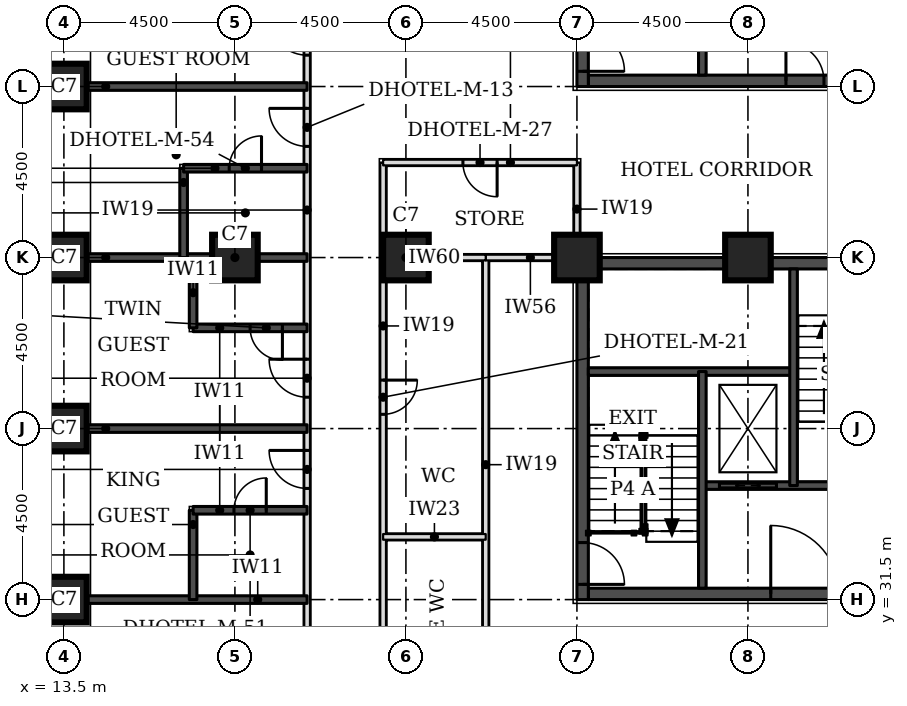
"""IFC4 building model, lengths in metres.
Left out: names, types, materials, properties, quantities, classifications, styles, units other than length and angle.
Written with IfcOpenShell. Run it as: python <this file> out.ifc"""

import sys

from ifc_helpers import new_model, si_unit, direction, frame, frame_2d, origin, origin_2d, place, context, subcontext, project, spatial, rectangle, extrude, element, fill, save


model = new_model("IFC4")
c1 = context("Model", 3, precision=1e-05, world=origin(), true_north=direction((0.0, 1.0)))
c2 = subcontext(c1, "Body", "Model", "MODEL_VIEW")
j1 = project(units=[si_unit("LENGTHUNIT", "METRE"), si_unit("PLANEANGLEUNIT", "RADIAN")], contexts=[c1])
p1 = place(None, origin())
s1 = spatial("IfcSite", under=j1, at=p1, CompositionType="ELEMENT")
p2 = place(p1, origin())
s2 = spatial("IfcBuilding", under=s1, at=p2, CompositionType="ELEMENT")
p3 = place(p2, frame((0.0, 0.0, 23.1)))
s3 = spatial("IfcBuildingStorey", under=s2, at=p3, CompositionType="ELEMENT", Elevation=23.1)
for number, where, z_axis, x_axis in (
    (1, (13.5, 31.5, 0.0), (0.0, 0.0, 1.0), (1.0, 0.0, 0.0)),
    (2, (13.5, 36.0, 0.0), (0.0, 0.0, 1.0), (1.0, 0.0, 0.0)),
    (3, (13.5, 40.5, 0.0), (0.0, 0.0, 1.0), (1.0, 0.0, 0.0)),
    (4, (18.0, 40.5, 0.0), (0.0, 0.0, 1.0), (1.0, 0.0, 0.0)),
    (5, (22.5, 40.5, 0.0), (0.0, 0.0, 1.0), (1.0, 0.0, 0.0)),
    (6, (27.0, 40.5, 0.0), (0.0, 0.0, 1.0), (1.0, 0.0, 0.0)),
    (7, (31.5, 40.5, 0.0), (0.0, 0.0, 1.0), (1.0, 0.0, 0.0)),
    (8, (13.5, 45.0, 0.0), (0.0, 0.0, 1.0), (1.0, 0.0, 0.0)),
):
    element("IfcColumn", number, at=place(p3, frame(where, z_axis=z_axis, x_axis=x_axis)), inside=s3, PredefinedType="COLUMN", context=c2, shape_type="SweptSolid", body=[
        extrude(rectangle(XDim=1.2, YDim=1.2, at=origin_2d()), origin(), (0.0, 0.0, 1.0), 3.3),
    ])
p4 = place(p3, frame((27.3, 45.15, 0.0), z_axis=(0.0, 0.0, 1.0), x_axis=(1.0, 0.0, 0.0)))
e9 = element("IfcWall", 9, at=p4, inside=s3, PredefinedType="SHEAR", context=c2, shape_type="SweptSolid", body=[
    extrude(rectangle(XDim=8.4, YDim=0.3, at=frame_2d((4.2, 0.0))), origin(), (0.0, 0.0, 1.0), 3.3),
])
p5 = place(p4, frame((5.2, 0.0, 0.0)))
e10 = element("IfcOpeningElement", 10, at=p5, cuts=e9, PredefinedType="OPENING", context=c2, shape_type="SweptSolid", body=[
    extrude(rectangle(XDim=1.0, YDim=2.1, at=frame_2d((0.5, 1.05))), frame((0.0, 0.16, 0.0), z_axis=(0.0, -1.0, 0.0), x_axis=(1.0, 0.0, 0.0)), (0.0, 0.0, 1.0), 0.32),
])
p6 = place(p3, frame((27.15, 45.0, 0.0), z_axis=(0.0, 0.0, 1.0), x_axis=(0.0, 1.0, 0.0)))
e11 = element("IfcWall", 11, at=p6, inside=s3, PredefinedType="SHEAR", context=c2, shape_type="SweptSolid", body=[
    extrude(rectangle(XDim=9.0, YDim=0.3, at=frame_2d((4.5, 0.0))), origin(), (0.0, 0.0, 1.0), 3.3),
])
p7 = place(p6, frame((0.4, 0.0, 0.0)))
e12 = element("IfcOpeningElement", 12, at=p7, cuts=e11, PredefinedType="OPENING", context=c2, shape_type="SweptSolid", body=[
    extrude(rectangle(XDim=1.1, YDim=2.1, at=frame_2d((0.55, 1.05))), frame((0.0, 0.16, 0.0), z_axis=(0.0, -1.0, 0.0), x_axis=(1.0, 0.0, 0.0)), (0.0, 0.0, 1.0), 0.32),
])
p8 = place(p3, frame((27.3, 31.65, 0.0), z_axis=(0.0, 0.0, 1.0), x_axis=(1.0, 0.0, 0.0)))
e13 = element("IfcWall", 13, at=p8, inside=s3, PredefinedType="SHEAR", context=c2, shape_type="SweptSolid", body=[
    extrude(rectangle(XDim=8.4, YDim=0.3, at=frame_2d((4.2, 0.0))), origin(), (0.0, 0.0, 1.0), 3.3),
])
p9 = place(p8, frame((4.8, 0.0, 0.0)))
e14 = element("IfcOpeningElement", 14, at=p9, cuts=e13, PredefinedType="OPENING", context=c2, shape_type="SweptSolid", body=[
    extrude(rectangle(XDim=1.8, YDim=2.1, at=frame_2d((0.9, 1.05))), frame((0.0, 0.16, 0.0), z_axis=(0.0, -1.0, 0.0), x_axis=(1.0, 0.0, 0.0)), (0.0, 0.0, 1.0), 0.32),
])
p10 = place(p3, frame((27.3, 40.35, 0.0), z_axis=(0.0, 0.0, 1.0), x_axis=(1.0, 0.0, 0.0)))
e15 = element("IfcWall", 15, at=p10, inside=s3, PredefinedType="SHEAR", context=c2, shape_type="SweptSolid", body=[
    extrude(rectangle(XDim=8.4, YDim=0.3, at=frame_2d((4.2, 0.0))), origin(), (0.0, 0.0, 1.0), 3.3),
])
p11 = place(p10, frame((6.4, 0.0, 0.0)))
e16 = element("IfcOpeningElement", 16, at=p11, cuts=e15, PredefinedType="OPENING", context=c2, shape_type="SweptSolid", body=[
    extrude(rectangle(XDim=1.1, YDim=2.1, at=frame_2d((0.55, 1.05))), frame((0.0, 0.16, 0.0), z_axis=(0.0, -1.0, 0.0), x_axis=(1.0, 0.0, 0.0)), (0.0, 0.0, 1.0), 0.32),
])
p12 = place(p3, frame((27.15, 31.5, 0.0), z_axis=(0.0, 0.0, 1.0), x_axis=(0.0, 1.0, 0.0)))
e17 = element("IfcWall", 17, at=p12, inside=s3, PredefinedType="SHEAR", context=c2, shape_type="SweptSolid", body=[
    extrude(rectangle(XDim=9.0, YDim=0.3, at=frame_2d((4.5, 0.0))), origin(), (0.0, 0.0, 1.0), 3.3),
])
p13 = place(p12, frame((0.4, 0.0, 0.0)))
e18 = element("IfcOpeningElement", 18, at=p13, cuts=e17, PredefinedType="OPENING", context=c2, shape_type="SweptSolid", body=[
    extrude(rectangle(XDim=1.1, YDim=2.1, at=frame_2d((0.55, 1.05))), frame((0.0, 0.16, 0.0), z_axis=(0.0, -1.0, 0.0), x_axis=(1.0, 0.0, 0.0)), (0.0, 0.0, 1.0), 0.32),
])
p14 = place(p3, frame((19.9, 24.4, 0.0), z_axis=(0.0, 0.0, 1.0), x_axis=(0.0, 1.0, 0.0)))
e19 = element("IfcWall", 19, at=p14, inside=s3, PredefinedType="PARTITIONING", context=c2, shape_type="SweptSolid", body=[
    extrude(rectangle(XDim=25.1, YDim=0.15, at=frame_2d((12.55, 0.0))), origin(), (0.0, 0.0, 1.0), 3.08),
])
p15 = place(p14, frame((0.447, 0.0, 0.0)))
e20 = element("IfcOpeningElement", 20, at=p15, cuts=e19, PredefinedType="OPENING", context=c2, shape_type="SweptSolid", body=[
    extrude(rectangle(XDim=0.9, YDim=2.1, at=frame_2d((0.45, 1.05))), frame((0.0, 0.085, 0.0), z_axis=(0.0, -1.0, 0.0), x_axis=(1.0, 0.0, 0.0)), (0.0, 0.0, 1.0), 0.17),
])
p16 = place(p14, frame((4.4, 0.0, 0.0)))
e21 = element("IfcOpeningElement", 21, at=p16, cuts=e19, PredefinedType="OPENING", context=c2, shape_type="SweptSolid", body=[
    extrude(rectangle(XDim=0.9, YDim=2.1, at=frame_2d((0.45, 1.05))), frame((0.0, 0.085, 0.0), z_axis=(0.0, -1.0, 0.0), x_axis=(1.0, 0.0, 0.0)), (0.0, 0.0, 1.0), 0.17),
])
p17 = place(p14, frame((10.025, 0.0, 0.0)))
e22 = element("IfcOpeningElement", 22, at=p17, cuts=e19, PredefinedType="OPENING", context=c2, shape_type="SweptSolid", body=[
    extrude(rectangle(XDim=1.0, YDim=2.1, at=frame_2d((0.5, 1.05))), frame((0.0, 0.085, 0.0), z_axis=(0.0, -1.0, 0.0), x_axis=(1.0, 0.0, 0.0)), (0.0, 0.0, 1.0), 0.17),
])
p18 = place(p14, frame((12.425, 0.0, 0.0)))
e23 = element("IfcOpeningElement", 23, at=p18, cuts=e19, PredefinedType="OPENING", context=c2, shape_type="SweptSolid", body=[
    extrude(rectangle(XDim=1.0, YDim=2.1, at=frame_2d((0.5, 1.05))), frame((0.0, 0.085, 0.0), z_axis=(0.0, -1.0, 0.0), x_axis=(1.0, 0.0, 0.0)), (0.0, 0.0, 1.0), 0.17),
])
p19 = place(p14, frame((19.025, 0.0, 0.0)))
e24 = element("IfcOpeningElement", 24, at=p19, cuts=e19, PredefinedType="OPENING", context=c2, shape_type="SweptSolid", body=[
    extrude(rectangle(XDim=1.0, YDim=2.1, at=frame_2d((0.5, 1.05))), frame((0.0, 0.085, 0.0), z_axis=(0.0, -1.0, 0.0), x_axis=(1.0, 0.0, 0.0)), (0.0, 0.0, 1.0), 0.17),
])
p20 = place(p14, frame((21.425, 0.0, 0.0)))
e25 = element("IfcOpeningElement", 25, at=p20, cuts=e19, PredefinedType="OPENING", context=c2, shape_type="SweptSolid", body=[
    extrude(rectangle(XDim=1.0, YDim=2.1, at=frame_2d((0.5, 1.05))), frame((0.0, 0.085, 0.0), z_axis=(0.0, -1.0, 0.0), x_axis=(1.0, 0.0, 0.0)), (0.0, 0.0, 1.0), 0.17),
])
p21 = place(p3, frame((21.9, 26.4, 0.0), z_axis=(0.0, 0.0, 1.0), x_axis=(0.0, 1.0, 0.0)))
e26 = element("IfcWall", 26, at=p21, inside=s3, PredefinedType="PARTITIONING", context=c2, shape_type="SweptSolid", body=[
    extrude(rectangle(XDim=16.6, YDim=0.15, at=frame_2d((8.3, 0.0))), origin(), (0.0, 0.0, 1.0), 3.08),
])
p22 = place(p21, frame((2.925, 0.0, 0.0)))
e27 = element("IfcOpeningElement", 27, at=p22, cuts=e26, PredefinedType="OPENING", context=c2, shape_type="SweptSolid", body=[
    extrude(rectangle(XDim=0.9, YDim=2.1, at=frame_2d((0.45, 1.05))), frame((0.0, 0.085, 0.0), z_axis=(0.0, -1.0, 0.0), x_axis=(1.0, 0.0, 0.0)), (0.0, 0.0, 1.0), 0.17),
])
p23 = place(p21, frame((9.975, 0.0, 0.0)))
e28 = element("IfcOpeningElement", 28, at=p23, cuts=e26, PredefinedType="OPENING", context=c2, shape_type="SweptSolid", body=[
    extrude(rectangle(XDim=0.9, YDim=2.1, at=frame_2d((0.45, 1.05))), frame((0.0, 0.085, 0.0), z_axis=(0.0, -1.0, 0.0), x_axis=(1.0, 0.0, 0.0)), (0.0, 0.0, 1.0), 0.17),
])
p24 = place(p3, frame((24.6, 26.4, 0.0), z_axis=(0.0, 0.0, 1.0), x_axis=(0.0, 1.0, 0.0)))
e29 = element("IfcWall", 29, at=p24, inside=s3, PredefinedType="PARTITIONING", context=c2, shape_type="SweptSolid", body=[
    extrude(rectangle(XDim=14.1, YDim=0.15, at=frame_2d((7.05, 0.0))), origin(), (0.0, 0.0, 1.0), 3.08),
])
p25 = place(p3, frame((24.6, 40.5, 0.0), z_axis=(0.0, 0.0, 1.0), x_axis=(1.0, 0.0, 0.0)))
e30 = element("IfcWall", 30, at=p25, inside=s3, PredefinedType="PARTITIONING", context=c2, shape_type="SweptSolid", body=[
    extrude(rectangle(XDim=2.35, YDim=0.15, at=frame_2d((1.175, 0.0))), origin(), (0.0, 0.0, 1.0), 2.33),
])
p26 = place(p3, frame((27.0, 40.55, 0.0), z_axis=(0.0, 0.0, 1.0), x_axis=(0.0, 1.0, 0.0)))
e31 = element("IfcWall", 31, at=p26, inside=s3, PredefinedType="PARTITIONING", context=c2, shape_type="SweptSolid", body=[
    extrude(rectangle(XDim=2.45, YDim=0.15, at=frame_2d((1.225, 0.0))), origin(), (0.0, 0.0, 1.0), 3.08),
])
p27 = place(p3, frame((21.9, 43.0, 0.0), z_axis=(0.0, 0.0, 1.0), x_axis=(1.0, 0.0, 0.0)))
e32 = element("IfcWall", 32, at=p27, inside=s3, PredefinedType="PARTITIONING", context=c2, shape_type="SweptSolid", body=[
    extrude(rectangle(XDim=5.1, YDim=0.15, at=frame_2d((2.55, 0.0))), origin(), (0.0, 0.0, 1.0), 3.08),
])
p28 = place(p27, frame((2.1, 0.0, 0.0)))
e33 = element("IfcOpeningElement", 33, at=p28, cuts=e32, PredefinedType="OPENING", context=c2, shape_type="SweptSolid", body=[
    extrude(rectangle(XDim=0.9, YDim=2.1, at=frame_2d((0.45, 1.05))), frame((0.0, 0.085, 0.0), z_axis=(0.0, -1.0, 0.0), x_axis=(1.0, 0.0, 0.0)), (0.0, 0.0, 1.0), 0.17),
])
p29 = place(p3, frame((14.1, 31.5, 0.0), z_axis=(0.0, 0.0, 1.0), x_axis=(1.0, 0.0, 0.0)))
e34 = element("IfcWall", 34, at=p29, inside=s3, PredefinedType="SOLIDWALL", context=c2, shape_type="SweptSolid", body=[
    extrude(rectangle(XDim=5.8, YDim=0.2, at=frame_2d((2.9, 0.0))), origin(), (0.0, 0.0, 1.0), 3.08),
])
p30 = place(p3, frame((16.9, 31.5, 0.0), z_axis=(0.0, 0.0, 1.0), x_axis=(0.0, 1.0, 0.0)))
e35 = element("IfcWall", 35, at=p30, inside=s3, PredefinedType="SOLIDWALL", context=c2, shape_type="SweptSolid", body=[
    extrude(rectangle(XDim=2.35, YDim=0.2, at=frame_2d((1.175, 0.0))), origin(), (0.0, 0.0, 1.0), 3.08),
])
p31 = place(p3, frame((16.9, 33.85, 0.0), z_axis=(0.0, 0.0, 1.0), x_axis=(1.0, 0.0, 0.0)))
e36 = element("IfcWall", 36, at=p31, inside=s3, PredefinedType="SOLIDWALL", context=c2, shape_type="SweptSolid", body=[
    extrude(rectangle(XDim=3.0, YDim=0.2, at=frame_2d((1.5, 0.0))), origin(), (0.0, 0.0, 1.0), 3.08),
])
p32 = place(p31, frame((1.075, 0.0, 0.0)))
e37 = element("IfcOpeningElement", 37, at=p32, cuts=e36, PredefinedType="OPENING", context=c2, shape_type="SweptSolid", body=[
    extrude(rectangle(XDim=0.85, YDim=2.1, at=frame_2d((0.425, 1.05))), frame((0.0, 0.11, 0.0), z_axis=(0.0, -1.0, 0.0), x_axis=(1.0, 0.0, 0.0)), (0.0, 0.0, 1.0), 0.22),
])
p33 = place(p3, frame((14.1, 36.0, 0.0), z_axis=(0.0, 0.0, 1.0), x_axis=(1.0, 0.0, 0.0)))
e38 = element("IfcWall", 38, at=p33, inside=s3, PredefinedType="SOLIDWALL", context=c2, shape_type="SweptSolid", body=[
    extrude(rectangle(XDim=5.8, YDim=0.2, at=frame_2d((2.9, 0.0))), origin(), (0.0, 0.0, 1.0), 3.08),
])
p34 = place(p3, frame((16.9, 38.65, 0.0), z_axis=(0.0, 0.0, 1.0), x_axis=(1.0, 0.0, 0.0)))
e39 = element("IfcWall", 39, at=p34, inside=s3, PredefinedType="SOLIDWALL", context=c2, shape_type="SweptSolid", body=[
    extrude(rectangle(XDim=3.0, YDim=0.2, at=frame_2d((1.5, 0.0))), origin(), (0.0, 0.0, 1.0), 3.08),
])
p35 = place(p34, frame((1.5, 0.0, 0.0)))
e40 = element("IfcOpeningElement", 40, at=p35, cuts=e39, PredefinedType="OPENING", context=c2, shape_type="SweptSolid", body=[
    extrude(rectangle(XDim=0.85, YDim=2.1, at=frame_2d((0.425, 1.05))), frame((0.0, 0.11, 0.0), z_axis=(0.0, -1.0, 0.0), x_axis=(1.0, 0.0, 0.0)), (0.0, 0.0, 1.0), 0.22),
])
p36 = place(p3, frame((16.9, 38.65, 0.0), z_axis=(0.0, 0.0, 1.0), x_axis=(0.0, 1.0, 0.0)))
e41 = element("IfcWall", 41, at=p36, inside=s3, PredefinedType="SOLIDWALL", context=c2, shape_type="SweptSolid", body=[
    extrude(rectangle(XDim=1.85, YDim=0.2, at=frame_2d((0.925, 0.0))), origin(), (0.0, 0.0, 1.0), 3.08),
])
p37 = place(p3, frame((14.1, 40.5, 0.0), z_axis=(0.0, 0.0, 1.0), x_axis=(1.0, 0.0, 0.0)))
e42 = element("IfcWall", 42, at=p37, inside=s3, PredefinedType="SOLIDWALL", context=c2, shape_type="SweptSolid", body=[
    extrude(rectangle(XDim=5.8, YDim=0.2, at=frame_2d((2.9, 0.0))), origin(), (0.0, 0.0, 1.0), 3.08),
])
p38 = place(p3, frame((16.65, 40.5, 0.0), z_axis=(0.0, 0.0, 1.0), x_axis=(0.0, 1.0, 0.0)))
e43 = element("IfcWall", 43, at=p38, inside=s3, PredefinedType="SOLIDWALL", context=c2, shape_type="SweptSolid", body=[
    extrude(rectangle(XDim=2.35, YDim=0.2, at=frame_2d((1.175, 0.0))), origin(), (0.0, 0.0, 1.0), 3.08),
])
p39 = place(p3, frame((16.65, 42.85, 0.0), z_axis=(0.0, 0.0, 1.0), x_axis=(1.0, 0.0, 0.0)))
e44 = element("IfcWall", 44, at=p39, inside=s3, PredefinedType="SOLIDWALL", context=c2, shape_type="SweptSolid", body=[
    extrude(rectangle(XDim=3.25, YDim=0.2, at=frame_2d((1.625, 0.0))), origin(), (0.0, 0.0, 1.0), 3.08),
])
p40 = place(p39, frame((1.2, 0.0, 0.0)))
e45 = element("IfcOpeningElement", 45, at=p40, cuts=e44, PredefinedType="OPENING", context=c2, shape_type="SweptSolid", body=[
    extrude(rectangle(XDim=0.85, YDim=2.1, at=frame_2d((0.425, 1.05))), frame((0.0, 0.11, 0.0), z_axis=(0.0, -1.0, 0.0), x_axis=(1.0, 0.0, 0.0)), (0.0, 0.0, 1.0), 0.22),
])
p41 = place(p3, frame((14.1, 45.0, 0.0), z_axis=(0.0, 0.0, 1.0), x_axis=(1.0, 0.0, 0.0)))
e46 = element("IfcWall", 46, at=p41, inside=s3, PredefinedType="SOLIDWALL", context=c2, shape_type="SweptSolid", body=[
    extrude(rectangle(XDim=5.8, YDim=0.2, at=frame_2d((2.9, 0.0))), origin(), (0.0, 0.0, 1.0), 3.08),
])
p42 = place(p3, frame((21.9, 33.15, 0.0), z_axis=(0.0, 0.0, 1.0), x_axis=(1.0, 0.0, 0.0)))
e47 = element("IfcWall", 47, at=p42, inside=s3, PredefinedType="PARTITIONING", context=c2, shape_type="SweptSolid", body=[
    extrude(rectangle(XDim=2.7, YDim=0.15, at=frame_2d((1.35, 0.0))), origin(), (0.0, 0.0, 1.0), 3.08),
])
p43 = place(p3, frame((21.9, 40.5, 0.0), z_axis=(0.0, 0.0, 1.0), x_axis=(1.0, 0.0, 0.0)))
e48 = element("IfcWall", 48, at=p43, inside=s3, PredefinedType="PARTITIONING", context=c2, shape_type="SweptSolid", body=[
    extrude(rectangle(XDim=2.7, YDim=0.15, at=frame_2d((1.35, 0.0))), origin(), (0.0, 0.0, 1.0), 2.33),
])
p44 = place(p3, frame((30.3, 45.3, 0.0), z_axis=(0.0, 0.0, 1.0), x_axis=(0.0, 1.0, 0.0)))
e49 = element("IfcWall", 49, at=p44, inside=s3, PredefinedType="SOLIDWALL", context=c2, shape_type="SweptSolid", body=[
    extrude(rectangle(XDim=5.7, YDim=0.2, at=frame_2d((2.85, 0.0))), origin(), (0.0, 0.0, 1.0), 3.08),
])
p45 = place(p3, frame((30.3, 34.5, 0.0), z_axis=(0.0, 0.0, 1.0), x_axis=(1.0, 0.0, 0.0)))
e50 = element("IfcWall", 50, at=p45, inside=s3, PredefinedType="SOLIDWALL", context=c2, shape_type="SweptSolid", body=[
    extrude(rectangle(XDim=5.4, YDim=0.2, at=frame_2d((2.7, 0.0))), origin(), (0.0, 0.0, 1.0), 3.08),
])
p46 = place(p45, frame((0.45, 0.0, 0.0)))
e51 = element("IfcOpeningElement", 51, at=p46, cuts=e50, PredefinedType="OPENING", context=c2, shape_type="SweptSolid", body=[
    extrude(rectangle(XDim=1.5, YDim=2.1, at=frame_2d((0.75, 1.05))), frame((0.0, 0.11, 0.0), z_axis=(0.0, -1.0, 0.0), x_axis=(1.0, 0.0, 0.0)), (0.0, 0.0, 1.0), 0.22),
])
p47 = place(p3, frame((27.3, 37.5, 0.0), z_axis=(0.0, 0.0, 1.0), x_axis=(1.0, 0.0, 0.0)))
e52 = element("IfcWall", 52, at=p47, inside=s3, PredefinedType="SOLIDWALL", context=c2, shape_type="SweptSolid", body=[
    extrude(rectangle(XDim=5.4, YDim=0.2, at=frame_2d((2.7, 0.0))), origin(), (0.0, 0.0, 1.0), 3.08),
])
for number, where, z_axis, x_axis in (
    (53, (30.3, 31.8, 0.0), (0.0, 0.0, 1.0), (0.0, 1.0, 0.0)),
    (54, (32.7, 34.5, 0.0), (0.0, 0.0, 1.0), (0.0, 1.0, 0.0)),
):
    element("IfcWall", number, at=place(p3, frame(where, z_axis=z_axis, x_axis=x_axis)), inside=s3, PredefinedType="SOLIDWALL", context=c2, shape_type="SweptSolid", body=[
        extrude(rectangle(XDim=5.7, YDim=0.2, at=frame_2d((2.85, 0.0))), origin(), (0.0, 0.0, 1.0), 3.08),
    ])
p48 = place(p17, origin())
e55 = element("IfcDoor", 55, at=p48, inside=s3, OperationType="SINGLE_SWING_RIGHT", PredefinedType="DOOR", context=c2, shape_type="SweptSolid", body=[
    extrude(rectangle(XDim=1.0, YDim=2.1, at=frame_2d((0.5, 1.05))), frame((0.0, 0.025, 0.0), z_axis=(0.0, -1.0, 0.0), x_axis=(1.0, 0.0, 0.0)), (0.0, 0.0, 1.0), 0.05),
])
fill(e22, e55)
p49 = place(p32, origin())
e56 = element("IfcDoor", 56, at=p49, inside=s3, OperationType="SINGLE_SWING_RIGHT", PredefinedType="DOOR", context=c2, shape_type="SweptSolid", body=[
    extrude(rectangle(XDim=0.85, YDim=2.1, at=frame_2d((0.425, 1.05))), frame((0.0, 0.025, 0.0), z_axis=(0.0, -1.0, 0.0), x_axis=(1.0, 0.0, 0.0)), (0.0, 0.0, 1.0), 0.05),
])
fill(e37, e56)
p50 = place(p18, origin())
e57 = element("IfcDoor", 57, at=p50, inside=s3, OperationType="SINGLE_SWING_RIGHT", PredefinedType="DOOR", context=c2, shape_type="SweptSolid", body=[
    extrude(rectangle(XDim=1.0, YDim=2.1, at=frame_2d((0.5, 1.05))), frame((0.0, 0.025, 0.0), z_axis=(0.0, -1.0, 0.0), x_axis=(1.0, 0.0, 0.0)), (0.0, 0.0, 1.0), 0.05),
])
fill(e23, e57)
p51 = place(p35, frame((0.85, 0.0, 0.0), z_axis=(0.0, 0.0, 1.0), x_axis=(-1.0, 0.0, 0.0)))
e58 = element("IfcDoor", 58, at=p51, inside=s3, OperationType="SINGLE_SWING_LEFT", PredefinedType="DOOR", context=c2, shape_type="SweptSolid", body=[
    extrude(rectangle(XDim=0.85, YDim=2.1, at=frame_2d((0.425, 1.05))), frame((0.0, 0.025, 0.0), z_axis=(0.0, -1.0, 0.0), x_axis=(1.0, 0.0, 0.0)), (0.0, 0.0, 1.0), 0.05),
])
fill(e40, e58)
p52 = place(p19, origin())
e59 = element("IfcDoor", 59, at=p52, inside=s3, OperationType="SINGLE_SWING_RIGHT", PredefinedType="DOOR", context=c2, shape_type="SweptSolid", body=[
    extrude(rectangle(XDim=1.0, YDim=2.1, at=frame_2d((0.5, 1.05))), frame((0.0, 0.025, 0.0), z_axis=(0.0, -1.0, 0.0), x_axis=(1.0, 0.0, 0.0)), (0.0, 0.0, 1.0), 0.05),
])
fill(e24, e59)
p53 = place(p40, origin())
e60 = element("IfcDoor", 60, at=p53, inside=s3, OperationType="SINGLE_SWING_RIGHT", PredefinedType="DOOR", context=c2, shape_type="SweptSolid", body=[
    extrude(rectangle(XDim=0.85, YDim=2.1, at=frame_2d((0.425, 1.05))), frame((0.0, 0.025, 0.0), z_axis=(0.0, -1.0, 0.0), x_axis=(1.0, 0.0, 0.0)), (0.0, 0.0, 1.0), 0.05),
])
fill(e45, e60)
p54 = place(p20, origin())
e61 = element("IfcDoor", 61, at=p54, inside=s3, OperationType="SINGLE_SWING_RIGHT", PredefinedType="DOOR", context=c2, shape_type="SweptSolid", body=[
    extrude(rectangle(XDim=1.0, YDim=2.1, at=frame_2d((0.5, 1.05))), frame((0.0, 0.025, 0.0), z_axis=(0.0, -1.0, 0.0), x_axis=(1.0, 0.0, 0.0)), (0.0, 0.0, 1.0), 0.05),
])
fill(e25, e61)
p55 = place(p23, frame((0.9, 0.0, 0.0), z_axis=(0.0, 0.0, 1.0), x_axis=(-1.0, 0.0, 0.0)))
e62 = element("IfcDoor", 62, at=p55, inside=s3, OperationType="SINGLE_SWING_LEFT", PredefinedType="DOOR", context=c2, shape_type="SweptSolid", body=[
    extrude(rectangle(XDim=0.9, YDim=2.1, at=frame_2d((0.45, 1.05))), frame((0.0, 0.025, 0.0), z_axis=(0.0, -1.0, 0.0), x_axis=(1.0, 0.0, 0.0)), (0.0, 0.0, 1.0), 0.05),
])
fill(e28, e62)
p56 = place(p28, frame((0.9, 0.0, 0.0), z_axis=(0.0, 0.0, 1.0), x_axis=(-1.0, 0.0, 0.0)))
e63 = element("IfcDoor", 63, at=p56, inside=s3, OperationType="SINGLE_SWING_LEFT", PredefinedType="DOOR", context=c2, shape_type="SweptSolid", body=[
    extrude(rectangle(XDim=0.9, YDim=2.1, at=frame_2d((0.45, 1.05))), frame((0.0, 0.025, 0.0), z_axis=(0.0, -1.0, 0.0), x_axis=(1.0, 0.0, 0.0)), (0.0, 0.0, 1.0), 0.05),
])
fill(e33, e63)
p57 = place(p7, frame((1.1, 0.0, 0.0), z_axis=(0.0, 0.0, 1.0), x_axis=(-1.0, 0.0, 0.0)))
e64 = element("IfcDoor", 64, at=p57, inside=s3, OperationType="SINGLE_SWING_RIGHT", PredefinedType="DOOR", context=c2, shape_type="SweptSolid", body=[
    extrude(rectangle(XDim=1.1, YDim=2.1, at=frame_2d((0.55, 1.05))), frame((0.0, 0.025, 0.0), z_axis=(0.0, -1.0, 0.0), x_axis=(1.0, 0.0, 0.0)), (0.0, 0.0, 1.0), 0.05),
])
fill(e12, e64)
p58 = place(p5, origin())
e65 = element("IfcDoor", 65, at=p58, inside=s3, OperationType="SINGLE_SWING_LEFT", PredefinedType="DOOR", context=c2, shape_type="SweptSolid", body=[
    extrude(rectangle(XDim=1.0, YDim=2.1, at=frame_2d((0.5, 1.05))), frame((0.0, 0.025, 0.0), z_axis=(0.0, -1.0, 0.0), x_axis=(1.0, 0.0, 0.0)), (0.0, 0.0, 1.0), 0.05),
])
fill(e10, e65)
p59 = place(p13, frame((1.1, 0.0, 0.0), z_axis=(0.0, 0.0, 1.0), x_axis=(-1.0, 0.0, 0.0)))
e66 = element("IfcDoor", 66, at=p59, inside=s3, OperationType="SINGLE_SWING_RIGHT", PredefinedType="DOOR", context=c2, shape_type="SweptSolid", body=[
    extrude(rectangle(XDim=1.1, YDim=2.1, at=frame_2d((0.55, 1.05))), frame((0.0, 0.025, 0.0), z_axis=(0.0, -1.0, 0.0), x_axis=(1.0, 0.0, 0.0)), (0.0, 0.0, 1.0), 0.05),
])
fill(e18, e66)
p60 = place(p46, origin())
e67 = element("IfcDoor", 67, at=p60, inside=s3, OperationType="DOUBLE_DOOR_SLIDING", PredefinedType="DOOR", context=c2, shape_type="SweptSolid", body=[
    extrude(rectangle(XDim=1.5, YDim=2.1, at=frame_2d((0.75, 1.05))), frame((0.0, 0.025, 0.0), z_axis=(0.0, -1.0, 0.0), x_axis=(1.0, 0.0, 0.0)), (0.0, 0.0, 1.0), 0.05),
])
fill(e51, e67)
p61 = place(p9, origin())
e68 = element("IfcDoor", 68, at=p61, inside=s3, OperationType="SINGLE_SWING_LEFT", PredefinedType="DOOR", context=c2, shape_type="SweptSolid", body=[
    extrude(rectangle(XDim=1.8, YDim=2.1, at=frame_2d((0.9, 1.05))), frame((0.0, 0.025, 0.0), z_axis=(0.0, -1.0, 0.0), x_axis=(1.0, 0.0, 0.0)), (0.0, 0.0, 1.0), 0.05),
])
fill(e14, e68)
save(model, sys.argv[1])
